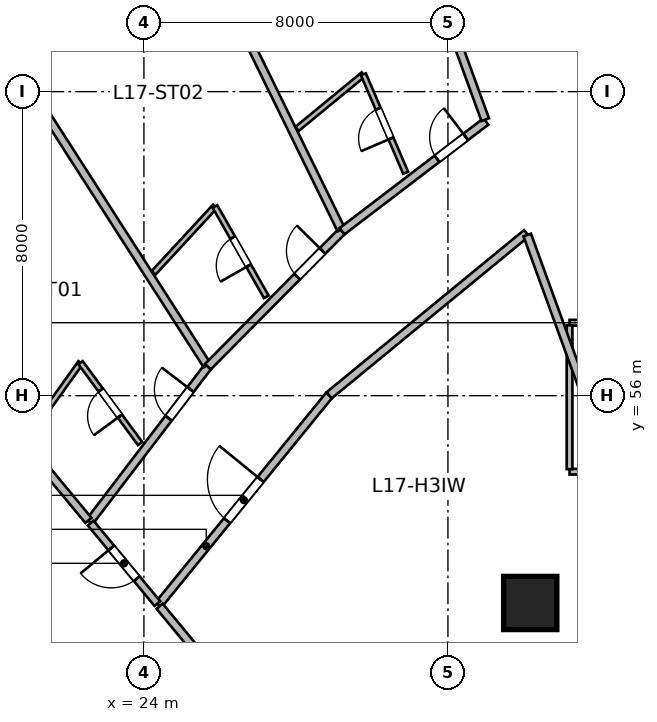
"""IFC4 building model, lengths in metres.
Left out: names, types, materials, properties, quantities, classifications, styles, units other than length and angle.
Written with IfcOpenShell. Run it as: python <this file> out.ifc"""

import sys

from ifc_helpers import new_model, si_unit, direction, frame, frame_2d, origin, origin_2d, place, context, subcontext, project, spatial, rectangle, circle, extrude, source, transform, mapped, element, fill, save


model = new_model("IFC4")
c1 = context("Model", 3, precision=1e-05, world=origin(), true_north=direction((0.0, 1.0)))
c2 = subcontext(c1, "Body", "Model", "MODEL_VIEW")
j1 = project(units=[si_unit("LENGTHUNIT", "METRE"), si_unit("PLANEANGLEUNIT", "RADIAN")], contexts=[c1])
p1 = place(None, origin())
s1 = spatial("IfcSite", under=j1, at=p1, CompositionType="ELEMENT")
p2 = place(p1, origin())
s2 = spatial("IfcBuilding", under=s1, at=p2, CompositionType="ELEMENT")
p3 = place(p2, frame((0.0, 0.0, 75.0)))
s3 = spatial("IfcBuildingStorey", under=s2, at=p3, CompositionType="ELEMENT", Elevation=75.0)
m1 = source(origin(), c2, "Body", "SweptSolid", [
    extrude(circle(Radius=0.7, at=origin_2d()), origin(), (0.0, 0.0, 1.0), 3.6),
])
p4 = place(p3, frame((34.166, 50.545, 0.0), z_axis=(0.0, 0.0, 1.0), x_axis=(-0.436173672171, 0.899862504889, 0.0)))
e1 = element("IfcColumn", 1, at=p4, inside=s3, PredefinedType="COLUMN", context=c2, shape_type="MappedRepresentation", body=[
    mapped(m1, transform((0.0, 0.0, 0.0), scale=1.0)),
])
m2 = source(origin(), c2, "Body", "SweptSolid", [
    extrude(rectangle(XDim=6.6, YDim=0.15, at=frame_2d((3.3, 0.0))), origin(), (0.0, 0.0, 1.0), 2.803),
])
p5 = place(p3, frame((35.2, 54.0, 0.0), z_axis=(0.0, 0.0, 1.0), x_axis=(1.0, 0.0, 0.0)))
e2 = element("IfcWall", 2, at=p5, inside=s3, PredefinedType="PARTITIONING", context=c2, shape_type="MappedRepresentation", body=[
    mapped(m2, transform((0.0, 0.0, 0.0), scale=1.0)),
])
m3 = source(origin(), c2, "Body", "SweptSolid", [
    extrude(rectangle(XDim=6.6, YDim=0.15, at=frame_2d((3.3, 0.0))), origin(), (0.0, 0.0, 1.0), 3.36),
])
p6 = place(p3, frame((35.2, 57.92, 0.0), z_axis=(0.0, 0.0, 1.0), x_axis=(1.0, 0.0, 0.0)))
e3 = element("IfcWall", 3, at=p6, inside=s3, PredefinedType="PARTITIONING", context=c2, shape_type="MappedRepresentation", body=[
    mapped(m3, transform((0.0, 0.0, 0.0), scale=1.0)),
])
p7 = place(p6, frame((2.85, 0.0, 0.0)))
e4 = element("IfcOpeningElement", 4, at=p7, cuts=e3, PredefinedType="OPENING", context=c2, shape_type="SweptSolid", body=[
    extrude(rectangle(XDim=0.9, YDim=2.1, at=frame_2d((0.45, 1.05))), frame((0.0, 0.085, 0.0), z_axis=(0.0, -1.0, 0.0), x_axis=(1.0, 0.0, 0.0)), (0.0, 0.0, 1.0), 0.17),
])
m4 = source(origin(), c2, "Body", "SweptSolid", [
    extrude(rectangle(XDim=3.785, YDim=0.15, at=frame_2d((1.893, 0.0))), origin(), (0.0, 0.0, 1.0), 3.36),
])
p8 = place(p3, frame((35.2, 54.067, 0.0), z_axis=(0.0, 0.0, 1.0), x_axis=(0.0, 1.0, 0.0)))
e5 = element("IfcWall", 5, at=p8, inside=s3, PredefinedType="PARTITIONING", context=c2, shape_type="MappedRepresentation", body=[
    mapped(m4, transform((0.0, 0.0, 0.0), scale=1.0)),
])
m5 = source(origin(), c2, "Body", "SweptSolid", [
    extrude(rectangle(XDim=7.113, YDim=0.21, at=frame_2d((3.556, 0.0))), origin(), (0.0, 0.0, 1.0), 3.36),
])
p9 = place(p3, frame((24.383, 50.495, 0.0), z_axis=(0.0, 0.0, 1.0), x_axis=(0.63149032532, 0.775383755974, 0.0)))
e6 = element("IfcWall", 6, at=p9, inside=s3, PredefinedType="PARTITIONING", context=c2, shape_type="MappedRepresentation", body=[
    mapped(m5, transform((0.0, 0.0, 0.0), scale=1.0)),
])
p10 = place(p9, frame((2.856, 0.0, 0.0)))
e7 = element("IfcOpeningElement", 7, at=p10, cuts=e6, PredefinedType="OPENING", context=c2, shape_type="SweptSolid", body=[
    extrude(rectangle(XDim=1.4, YDim=2.15, at=frame_2d((0.7, 1.075))), frame((0.0, 0.115, 0.0), z_axis=(0.0, -1.0, 0.0), x_axis=(1.0, 0.0, 0.0)), (0.0, 0.0, 1.0), 0.23),
])
m6 = source(origin(), c2, "Body", "SweptSolid", [
    extrude(rectangle(XDim=6.721, YDim=0.21, at=frame_2d((3.361, 0.0))), origin(), (0.0, 0.0, 1.0), 3.36),
])
p11 = place(p3, frame((28.874, 56.01, 0.0), z_axis=(0.0, 0.0, 1.0), x_axis=(0.772828051199, 0.63461547671, 0.0)))
e8 = element("IfcWall", 8, at=p11, inside=s3, PredefinedType="PARTITIONING", context=c2, shape_type="MappedRepresentation", body=[
    mapped(m6, transform((0.0, 0.0, 0.0), scale=1.0)),
])
m7 = source(origin(), c2, "Body", "SweptSolid", [
    extrude(rectangle(XDim=11.053, YDim=0.21, at=frame_2d((5.527, 0.0))), origin(), (0.0, 0.0, 1.0), 3.36),
])
p12 = place(p3, frame((31.466, 41.949, 0.0), z_axis=(0.0, 0.0, 1.0), x_axis=(-0.638131235571, 0.769927611005, 0.0)))
e9 = element("IfcWall", 9, at=p12, inside=s3, PredefinedType="PARTITIONING", context=c2, shape_type="MappedRepresentation", body=[
    mapped(m7, transform((0.0, 0.0, 0.0), scale=1.0)),
])
m8 = source(origin(), c2, "Body", "SweptSolid", [
    extrude(rectangle(XDim=12.196, YDim=0.21, at=frame_2d((6.098, 0.0))), origin(), (0.0, 0.0, 1.0), 3.36),
])
p13 = place(p3, frame((38.258, 48.766, 0.0), z_axis=(0.0, 0.0, 1.0), x_axis=(-0.342022711534, 0.939691686031, 0.0)))
e10 = element("IfcWall", 10, at=p13, inside=s3, PredefinedType="PARTITIONING", context=c2, shape_type="MappedRepresentation", body=[
    mapped(m8, transform((0.0, 0.0, 0.0), scale=1.0)),
])
m9 = source(origin(), c2, "Body", "SweptSolid", [
    extrude(rectangle(XDim=5.135, YDim=0.21, at=frame_2d((2.567, 0.0))), origin(), (0.0, 0.0, 1.0), 3.36),
])
p14 = place(p3, frame((22.57, 52.683, 0.0), z_axis=(0.0, 0.0, 1.0), x_axis=(0.606802199649, 0.794852873494, 0.0)))
e11 = element("IfcWall", 11, at=p14, inside=s3, PredefinedType="PARTITIONING", context=c2, shape_type="MappedRepresentation", body=[
    mapped(m9, transform((0.0, 0.0, 0.0), scale=1.0)),
])
p15 = place(p14, frame((3.427, 0.0, 0.0)))
e12 = element("IfcOpeningElement", 12, at=p15, cuts=e11, PredefinedType="OPENING", context=c2, shape_type="SweptSolid", body=[
    extrude(rectangle(XDim=0.95, YDim=2.15, at=frame_2d((0.475, 1.075))), frame((0.0, 0.115, 0.0), z_axis=(0.0, -1.0, 0.0), x_axis=(1.0, 0.0, 0.0)), (0.0, 0.0, 1.0), 0.23),
])
m10 = source(origin(), c2, "Body", "SweptSolid", [
    extrude(rectangle(XDim=10.975, YDim=0.21, at=frame_2d((5.487, 0.0))), origin(), (0.0, 0.0, 1.0), 3.36),
])
p16 = place(p3, frame((22.54, 52.719, 0.0), z_axis=(0.0, 0.0, 1.0), x_axis=(-0.638125265812, 0.769932558821, 0.0)))
e13 = element("IfcWall", 13, at=p16, inside=s3, PredefinedType="PARTITIONING", context=c2, shape_type="MappedRepresentation", body=[
    mapped(m10, transform((0.0, 0.0, 0.0), scale=1.0)),
])
m11 = source(origin(), c2, "Body", "SweptSolid", [
    extrude(rectangle(XDim=11.432, YDim=0.21, at=frame_2d((5.716, 0.0))), origin(), (0.0, 0.0, 1.0), 3.36),
])
p17 = place(p3, frame((25.659, 56.805, 0.0), z_axis=(0.0, 0.0, 1.0), x_axis=(-0.540196183124, 0.841539115988, 0.0)))
e14 = element("IfcWall", 14, at=p17, inside=s3, PredefinedType="PARTITIONING", context=c2, shape_type="MappedRepresentation", body=[
    mapped(m11, transform((0.0, 0.0, 0.0), scale=1.0)),
])
m12 = source(origin(), c2, "Body", "SweptSolid", [
    extrude(rectangle(XDim=2.437, YDim=0.14, at=frame_2d((1.218, 0.0))), origin(), (0.0, 0.0, 1.0), 3.36),
])
p18 = place(p3, frame((20.915, 54.886, 0.0), z_axis=(0.0, 0.0, 1.0), x_axis=(0.581797219134, 0.813333877204, 0.0)))
e15 = element("IfcWall", 15, at=p18, inside=s3, PredefinedType="PARTITIONING", context=c2, shape_type="MappedRepresentation", body=[
    mapped(m12, transform((0.0, 0.0, 0.0), scale=1.0)),
])
m13 = source(origin(), c2, "Body", "SweptSolid", [
    extrude(rectangle(XDim=2.642, YDim=0.14, at=frame_2d((1.321, 0.0))), origin(), (0.0, 0.0, 1.0), 3.36),
])
p19 = place(p3, frame((23.899, 54.741, 0.0), z_axis=(0.0, 0.0, 1.0), x_axis=(-0.592789122423, 0.805357719487, 0.0)))
e16 = element("IfcWall", 16, at=p19, inside=s3, PredefinedType="PARTITIONING", context=c2, shape_type="MappedRepresentation", body=[
    mapped(m13, transform((0.0, 0.0, 0.0), scale=1.0)),
])
p20 = place(p19, frame((0.896, 0.0, 0.0)))
e17 = element("IfcOpeningElement", 17, at=p20, cuts=e16, PredefinedType="OPENING", context=c2, shape_type="SweptSolid", body=[
    extrude(rectangle(XDim=0.85, YDim=2.05, at=frame_2d((0.425, 1.025))), frame((0.0, 0.08, 0.0), z_axis=(0.0, -1.0, 0.0), x_axis=(1.0, 0.0, 0.0)), (0.0, 0.0, 1.0), 0.16),
])
m14 = source(origin(), c2, "Body", "SweptSolid", [
    extrude(rectangle(XDim=5.012, YDim=0.21, at=frame_2d((2.506, 0.0))), origin(), (0.0, 0.0, 1.0), 3.36),
])
p21 = place(p3, frame((25.685, 56.764, 0.0), z_axis=(0.0, 0.0, 1.0), x_axis=(0.703664626435, 0.710532260707, 0.0)))
e18 = element("IfcWall", 18, at=p21, inside=s3, PredefinedType="PARTITIONING", context=c2, shape_type="MappedRepresentation", body=[
    mapped(m14, transform((0.0, 0.0, 0.0), scale=1.0)),
])
p22 = place(p21, frame((3.335, 0.0, 0.0)))
e19 = element("IfcOpeningElement", 19, at=p22, cuts=e18, PredefinedType="OPENING", context=c2, shape_type="SweptSolid", body=[
    extrude(rectangle(XDim=0.95, YDim=2.15, at=frame_2d((0.475, 1.075))), frame((0.0, 0.115, 0.0), z_axis=(0.0, -1.0, 0.0), x_axis=(1.0, 0.0, 0.0)), (0.0, 0.0, 1.0), 0.23),
])
m15 = source(origin(), c2, "Body", "SweptSolid", [
    extrude(rectangle(XDim=11.775, YDim=0.21, at=frame_2d((5.887, 0.0))), origin(), (0.0, 0.0, 1.0), 2.644),
])
p23 = place(p3, frame((29.19, 60.371, 0.0), z_axis=(0.0, 0.0, 1.0), x_axis=(-0.4401500056, 0.897924257702, 0.0)))
e20 = element("IfcWall", 20, at=p23, inside=s3, PredefinedType="PARTITIONING", context=c2, shape_type="MappedRepresentation", body=[
    mapped(m15, transform((0.0, 0.0, 0.0), scale=1.0)),
])
m16 = source(origin(), c2, "Body", "SweptSolid", [
    extrude(rectangle(XDim=2.38, YDim=0.14, at=frame_2d((1.19, 0.0))), origin(), (0.0, 0.0, 1.0), 3.36),
])
p24 = place(p3, frame((24.253, 59.231, 0.0), z_axis=(0.0, 0.0, 1.0), x_axis=(0.679084816758, 0.734059814762, 0.0)))
e21 = element("IfcWall", 21, at=p24, inside=s3, PredefinedType="PARTITIONING", context=c2, shape_type="MappedRepresentation", body=[
    mapped(m16, transform((0.0, 0.0, 0.0), scale=1.0)),
])
m17 = source(origin(), c2, "Body", "SweptSolid", [
    extrude(rectangle(XDim=2.735, YDim=0.14, at=frame_2d((1.367, 0.0))), origin(), (0.0, 0.0, 1.0), 3.36),
])
p25 = place(p3, frame((27.219, 58.6, 0.0), z_axis=(0.0, 0.0, 1.0), x_axis=(-0.493694940578, 0.869635156631, 0.0)))
e22 = element("IfcWall", 22, at=p25, inside=s3, PredefinedType="PARTITIONING", context=c2, shape_type="MappedRepresentation", body=[
    mapped(m17, transform((0.0, 0.0, 0.0), scale=1.0)),
])
p26 = place(p25, frame((0.942, 0.0, 0.0)))
e23 = element("IfcOpeningElement", 23, at=p26, cuts=e22, PredefinedType="OPENING", context=c2, shape_type="SweptSolid", body=[
    extrude(rectangle(XDim=0.85, YDim=2.05, at=frame_2d((0.425, 1.025))), frame((0.0, 0.08, 0.0), z_axis=(0.0, -1.0, 0.0), x_axis=(1.0, 0.0, 0.0)), (0.0, 0.0, 1.0), 0.16),
])
m18 = source(origin(), c2, "Body", "SweptSolid", [
    extrude(rectangle(XDim=4.762, YDim=0.21, at=frame_2d((2.381, 0.0))), origin(), (0.0, 0.0, 1.0), 3.36),
])
p27 = place(p3, frame((29.212, 60.326, 0.0), z_axis=(0.0, 0.0, 1.0), x_axis=(0.795070295872, 0.60651729128, 0.0)))
e24 = element("IfcWall", 24, at=p27, inside=s3, PredefinedType="PARTITIONING", context=c2, shape_type="MappedRepresentation", body=[
    mapped(m18, transform((0.0, 0.0, 0.0), scale=1.0)),
])
p28 = place(p27, frame((3.144, 0.0, 0.0)))
e25 = element("IfcOpeningElement", 25, at=p28, cuts=e24, PredefinedType="OPENING", context=c2, shape_type="SweptSolid", body=[
    extrude(rectangle(XDim=0.95, YDim=2.15, at=frame_2d((0.475, 1.075))), frame((0.0, 0.115, 0.0), z_axis=(0.0, -1.0, 0.0), x_axis=(1.0, 0.0, 0.0)), (0.0, 0.0, 1.0), 0.23),
])
m19 = source(origin(), c2, "Body", "SweptSolid", [
    extrude(rectangle(XDim=12.088, YDim=0.21, at=frame_2d((6.044, 0.0))), origin(), (0.0, 0.0, 1.0), 3.36),
])
p29 = place(p3, frame((32.981, 63.262, 0.0), z_axis=(0.0, 0.0, 1.0), x_axis=(-0.34203007529, 0.939689005787, 0.0)))
e26 = element("IfcWall", 26, at=p29, inside=s3, PredefinedType="PARTITIONING", context=c2, shape_type="MappedRepresentation", body=[
    mapped(m19, transform((0.0, 0.0, 0.0), scale=1.0)),
])
m20 = source(origin(), c2, "Body", "SweptSolid", [
    extrude(rectangle(XDim=2.26, YDim=0.14, at=frame_2d((1.13, 0.0))), origin(), (0.0, 0.0, 1.0), 3.36),
])
p30 = place(p3, frame((28.029, 63.02, 0.0), z_axis=(0.0, 0.0, 1.0), x_axis=(0.772646789219, 0.634836151388, 0.0)))
e27 = element("IfcWall", 27, at=p30, inside=s3, PredefinedType="PARTITIONING", context=c2, shape_type="MappedRepresentation", body=[
    mapped(m20, transform((0.0, 0.0, 0.0), scale=1.0)),
])
m21 = source(origin(), c2, "Body", "SweptSolid", [
    extrude(rectangle(XDim=2.819, YDim=0.14, at=frame_2d((1.409, 0.0))), origin(), (0.0, 0.0, 1.0), 3.36),
])
p31 = place(p3, frame((30.888, 61.864, 0.0), z_axis=(0.0, 0.0, 1.0), x_axis=(-0.394420979357, 0.918929861874, 0.0)))
e28 = element("IfcWall", 28, at=p31, inside=s3, PredefinedType="PARTITIONING", context=c2, shape_type="MappedRepresentation", body=[
    mapped(m21, transform((0.0, 0.0, 0.0), scale=1.0)),
])
p32 = place(p31, frame((0.984, 0.0, 0.0)))
e29 = element("IfcOpeningElement", 29, at=p32, cuts=e28, PredefinedType="OPENING", context=c2, shape_type="SweptSolid", body=[
    extrude(rectangle(XDim=0.85, YDim=2.05, at=frame_2d((0.425, 1.025))), frame((0.0, 0.08, 0.0), z_axis=(0.0, -1.0, 0.0), x_axis=(1.0, 0.0, 0.0)), (0.0, 0.0, 1.0), 0.16),
])
m22 = source(origin(), c2, "Body", "SweptSolid", [
    extrude(rectangle(XDim=2.748, YDim=0.195, at=frame_2d((1.374, 0.0))), origin(), (0.0, 0.0, 1.0), 3.36),
])
p33 = place(p3, frame((24.353, 50.531, 0.0), z_axis=(0.0, 0.0, 1.0), x_axis=(-0.638111168284, 0.769944242729, 0.0)))
e30 = element("IfcWall", 30, at=p33, inside=s3, PredefinedType="PARTITIONING", context=c2, shape_type="MappedRepresentation", body=[
    mapped(m22, transform((0.0, 0.0, 0.0), scale=1.0)),
])
p34 = place(p33, frame((0.849, 0.0, 0.0)))
e31 = element("IfcOpeningElement", 31, at=p34, cuts=e30, PredefinedType="OPENING", context=c2, shape_type="SweptSolid", body=[
    extrude(rectangle(XDim=1.05, YDim=2.15, at=frame_2d((0.525, 1.075))), frame((0.0, 0.107, 0.0), z_axis=(0.0, -1.0, 0.0), x_axis=(1.0, 0.0, 0.0)), (0.0, 0.0, 1.0), 0.215),
])
m23 = source(origin(), c2, "Body", "SweptSolid", [
    extrude(rectangle(XDim=1.4, YDim=2.15, at=frame_2d((0.7, 1.075))), frame((0.0, 0.025, 0.0), z_axis=(0.0, -1.0, 0.0), x_axis=(1.0, 0.0, 0.0)), (0.0, 0.0, 1.0), 0.05),
])
p35 = place(p10, origin())
e32 = element("IfcDoor", 32, at=p35, inside=s3, OperationType="SINGLE_SWING_RIGHT", PredefinedType="DOOR", context=c2, shape_type="MappedRepresentation", body=[
    mapped(m23, transform((0.0, 0.0, 0.0), scale=1.0)),
])
fill(e7, e32)
m24 = source(origin(), c2, "Body", "SweptSolid", [
    extrude(rectangle(XDim=0.95, YDim=2.15, at=frame_2d((0.475, 1.075))), frame((0.0, 0.025, 0.0), z_axis=(0.0, -1.0, 0.0), x_axis=(1.0, 0.0, 0.0)), (0.0, 0.0, 1.0), 0.05),
])
p36 = place(p15, origin())
e33 = element("IfcDoor", 33, at=p36, inside=s3, OperationType="SINGLE_SWING_RIGHT", PredefinedType="DOOR", context=c2, shape_type="MappedRepresentation", body=[
    mapped(m24, transform((0.0, 0.0, 0.0), scale=1.0)),
])
fill(e12, e33)
m25 = source(origin(), c2, "Body", "SweptSolid", [
    extrude(rectangle(XDim=0.85, YDim=2.05, at=frame_2d((0.425, 1.025))), frame((0.0, 0.025, 0.0), z_axis=(0.0, -1.0, 0.0), x_axis=(1.0, 0.0, 0.0)), (0.0, 0.0, 1.0), 0.05),
])
p37 = place(p20, origin())
e34 = element("IfcDoor", 34, at=p37, inside=s3, OperationType="SINGLE_SWING_LEFT", PredefinedType="DOOR", context=c2, shape_type="MappedRepresentation", body=[
    mapped(m25, transform((0.0, 0.0, 0.0), scale=1.0)),
])
fill(e17, e34)
p38 = place(p22, origin())
e35 = element("IfcDoor", 35, at=p38, inside=s3, OperationType="SINGLE_SWING_RIGHT", PredefinedType="DOOR", context=c2, shape_type="MappedRepresentation", body=[
    mapped(m24, transform((0.0, 0.0, 0.0), scale=1.0)),
])
fill(e19, e35)
p39 = place(p26, origin())
e36 = element("IfcDoor", 36, at=p39, inside=s3, OperationType="SINGLE_SWING_LEFT", PredefinedType="DOOR", context=c2, shape_type="MappedRepresentation", body=[
    mapped(m25, transform((0.0, 0.0, 0.0), scale=1.0)),
])
fill(e23, e36)
p40 = place(p28, origin())
e37 = element("IfcDoor", 37, at=p40, inside=s3, OperationType="SINGLE_SWING_RIGHT", PredefinedType="DOOR", context=c2, shape_type="MappedRepresentation", body=[
    mapped(m24, transform((0.0, 0.0, 0.0), scale=1.0)),
])
fill(e25, e37)
p41 = place(p32, origin())
e38 = element("IfcDoor", 38, at=p41, inside=s3, OperationType="SINGLE_SWING_LEFT", PredefinedType="DOOR", context=c2, shape_type="MappedRepresentation", body=[
    mapped(m25, transform((0.0, 0.0, 0.0), scale=1.0)),
])
fill(e29, e38)
m26 = source(origin(), c2, "Body", "SweptSolid", [
    extrude(rectangle(XDim=1.05, YDim=2.15, at=frame_2d((0.525, 1.075))), frame((0.0, 0.025, 0.0), z_axis=(0.0, -1.0, 0.0), x_axis=(1.0, 0.0, 0.0)), (0.0, 0.0, 1.0), 0.05),
])
p42 = place(p34, origin())
e39 = element("IfcDoor", 39, at=p42, inside=s3, OperationType="SINGLE_SWING_RIGHT", PredefinedType="DOOR", context=c2, shape_type="MappedRepresentation", body=[
    mapped(m26, transform((0.0, 0.0, 0.0), scale=1.0)),
])
fill(e31, e39)
save(model, sys.argv[1])
